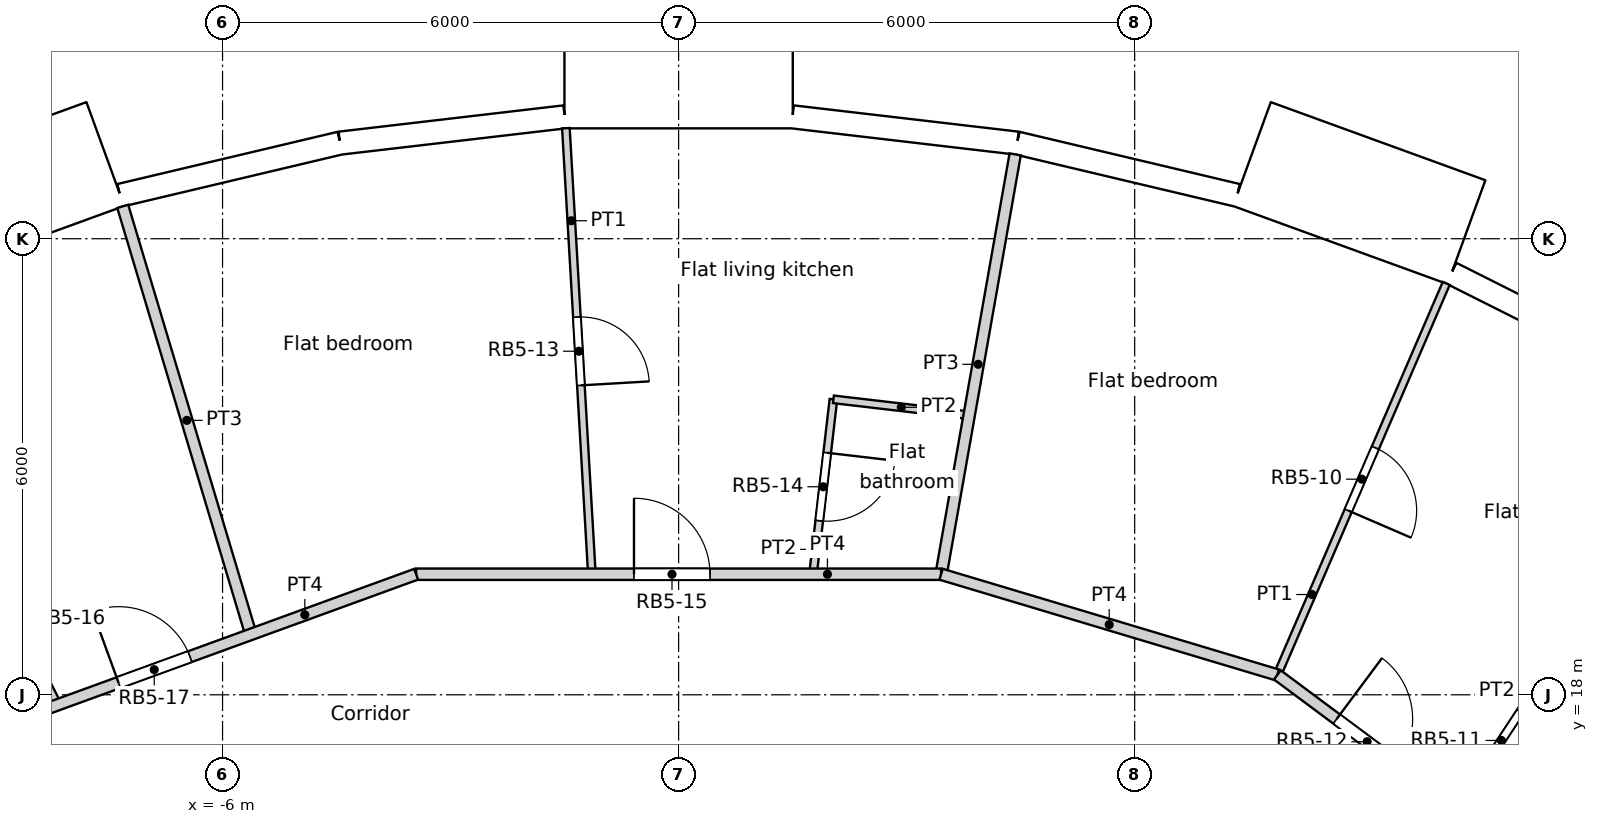
"""IFC4 building model, lengths in metres.
Left out: names, types, materials, properties, quantities, classifications, styles, units other than length and angle.
Written with IfcOpenShell. Run it as: python <this file> out.ifc"""

import sys

from ifc_helpers import new_model, si_unit, direction, frame, frame_2d, origin, origin_2d, place, context, subcontext, project, spatial, rectangle, circle, extrude, element, fill, save


model = new_model("IFC4")
c1 = context("Model", 3, precision=1e-05, world=origin(), true_north=direction((0.0, 1.0)))
c2 = subcontext(c1, "Body", "Model", "MODEL_VIEW")
j1 = project(units=[si_unit("LENGTHUNIT", "METRE"), si_unit("PLANEANGLEUNIT", "RADIAN")], contexts=[c1])
p1 = place(None, origin())
s1 = spatial("IfcSite", under=j1, at=p1, CompositionType="ELEMENT")
p2 = place(p1, origin())
s2 = spatial("IfcBuilding", under=s1, at=p2, CompositionType="ELEMENT")
p3 = place(p2, frame((0.0, 0.0, 169.2)))
s3 = spatial("IfcBuildingStorey", under=s2, at=p3, CompositionType="ELEMENT", Elevation=169.2)
for number, where, z_axis, x_axis in (
    (1, (9.723, 22.54, 0.0), (0.0, 0.0, 1.0), (1.0, 0.0, 0.0)),
    (2, (4.263, 24.175, 0.0), (0.0, 0.0, 1.0), (1.0, 0.0, 0.0)),
    (3, (-1.427, 24.506, 0.0), (0.0, 0.0, 1.0), (1.0, 0.0, 0.0)),
    (4, (-7.04, 23.516, 0.0), (0.0, 0.0, 1.0), (1.0, 0.0, 0.0)),
):
    element("IfcColumn", number, at=place(p3, frame(where, z_axis=z_axis, x_axis=x_axis)), inside=s3, PredefinedType="COLUMN", context=c2, shape_type="SweptSolid", body=[
        extrude(circle(Radius=0.6, at=origin_2d()), origin(), (0.0, 0.0, 1.0), 3.6),
    ])
for number, where, z_axis, x_axis in (
    (5, (6.876, 17.521, 0.0), (0.0, 0.0, 1.0), (1.0, 0.0, 0.0)),
    (6, (1.406, 18.77, 0.0), (0.0, 0.0, 1.0), (1.0, 0.0, 0.0)),
    (7, (-4.188, 18.35, 0.0), (0.0, 0.0, 1.0), (1.0, 0.0, 0.0)),
):
    element("IfcColumn", number, at=place(p3, frame(where, z_axis=z_axis, x_axis=x_axis)), inside=s3, PredefinedType="COLUMN", context=c2, shape_type="SweptSolid", body=[
        extrude(circle(Radius=0.65, at=origin_2d()), origin(), (0.0, 0.0, 1.0), 3.6),
    ])
p4 = place(p3, frame((12.824, 22.211, 0.0), z_axis=(0.0, 0.0, 1.0), x_axis=(-0.893637442555, 0.448789618045, 0.0)))
e8 = element("IfcWall", 8, at=p4, inside=s3, PredefinedType="SOLIDWALL", context=c2, shape_type="SweptSolid", body=[
    extrude(rectangle(XDim=2.973, YDim=0.3, at=frame_2d((1.486, 0.0))), origin(), (0.0, 0.0, 1.0), 3.3),
])
p5 = place(p4, frame((1.486, 0.0, 1.55)))
e9 = element("IfcOpeningElement", 9, at=p5, cuts=e8, PredefinedType="OPENING", context=c2, shape_type="SweptSolid", body=[
    extrude(circle(Radius=0.9, at=origin_2d()), frame((0.0, 0.16, 0.0), z_axis=(0.0, -1.0, 0.0), x_axis=(1.0, 0.0, 0.0)), (0.0, 0.0, 1.0), 0.32),
])
p6 = place(p3, frame((10.363, 24.087, -0.3), z_axis=(0.0, 0.0, 1.0), x_axis=(-0.939686455819, 0.342037080957, 0.0)))
e10 = element("IfcWall", 10, at=p6, inside=s3, PredefinedType="ELEMENTEDWALL", context=c2, shape_type="SweptSolid", body=[
    extrude(rectangle(XDim=3.0, YDim=1.45, at=frame_2d((1.5, 0.0))), origin(), (0.0, 0.0, 1.0), 3.6),
])
p7 = place(p6, frame((1.5, 0.0, 1.85)))
e11 = element("IfcOpeningElement", 11, at=p7, cuts=e10, PredefinedType="OPENING", context=c2, shape_type="SweptSolid", body=[
    extrude(circle(Radius=0.9, at=origin_2d()), frame((0.0, 0.735, 0.0), z_axis=(0.0, -1.0, 0.0), x_axis=(1.0, 0.0, 0.0)), (0.0, 0.0, 1.0), 1.47),
])
p8 = place(p3, frame((7.346, 24.572, 0.0), z_axis=(0.0, 0.0, 1.0), x_axis=(-0.973049746156, 0.230595298102, 0.0)))
e12 = element("IfcWall", 12, at=p8, inside=s3, PredefinedType="SOLIDWALL", context=c2, shape_type="SweptSolid", body=[
    extrude(rectangle(XDim=2.973, YDim=0.3, at=frame_2d((1.486, 0.0))), origin(), (0.0, 0.0, 1.0), 3.3),
])
p9 = place(p8, frame((1.486, 0.0, 1.55)))
e13 = element("IfcOpeningElement", 13, at=p9, cuts=e12, PredefinedType="OPENING", context=c2, shape_type="SweptSolid", body=[
    extrude(circle(Radius=0.9, at=origin_2d()), frame((0.0, 0.16, 0.0), z_axis=(0.0, -1.0, 0.0), x_axis=(1.0, 0.0, 0.0)), (0.0, 0.0, 1.0), 0.32),
])
p10 = place(p3, frame((4.454, 25.258, 0.0), z_axis=(0.0, 0.0, 1.0), x_axis=(-0.993235542767, 0.116116995244, 0.0)))
e14 = element("IfcWall", 14, at=p10, inside=s3, PredefinedType="SOLIDWALL", context=c2, shape_type="SweptSolid", body=[
    extrude(rectangle(XDim=2.973, YDim=0.3, at=frame_2d((1.486, 0.0))), origin(), (0.0, 0.0, 1.0), 3.3),
])
p11 = place(p10, frame((1.486, 0.0, 1.55)))
e15 = element("IfcOpeningElement", 15, at=p11, cuts=e14, PredefinedType="OPENING", context=c2, shape_type="SweptSolid", body=[
    extrude(circle(Radius=0.9, at=origin_2d()), frame((0.0, 0.16, 0.0), z_axis=(0.0, -1.0, 0.0), x_axis=(1.0, 0.0, 0.0)), (0.0, 0.0, 1.0), 0.32),
])
p12 = place(p3, frame((1.5, 26.179, -0.3), z_axis=(0.0, 0.0, 1.0), x_axis=(-1.0, 0.0, 0.0)))
e16 = element("IfcWall", 16, at=p12, inside=s3, PredefinedType="ELEMENTEDWALL", context=c2, shape_type="SweptSolid", body=[
    extrude(rectangle(XDim=3.0, YDim=1.45, at=frame_2d((1.5, 0.0))), origin(), (0.0, 0.0, 1.0), 3.6),
])
p13 = place(p12, frame((1.5, 0.0, 1.85)))
e17 = element("IfcOpeningElement", 17, at=p13, cuts=e16, PredefinedType="OPENING", context=c2, shape_type="SweptSolid", body=[
    extrude(circle(Radius=0.9, at=origin_2d()), frame((0.0, 0.735, 0.0), z_axis=(0.0, -1.0, 0.0), x_axis=(1.0, 0.0, 0.0)), (0.0, 0.0, 1.0), 1.47),
])
p14 = place(p3, frame((-1.501, 25.603, 0.0), z_axis=(0.0, 0.0, 1.0), x_axis=(-0.993235542767, -0.116116995244, 0.0)))
e18 = element("IfcWall", 18, at=p14, inside=s3, PredefinedType="SOLIDWALL", context=c2, shape_type="SweptSolid", body=[
    extrude(rectangle(XDim=2.973, YDim=0.3, at=frame_2d((1.486, 0.0))), origin(), (0.0, 0.0, 1.0), 3.3),
])
p15 = place(p14, frame((1.486, 0.0, 1.55)))
e19 = element("IfcOpeningElement", 19, at=p15, cuts=e18, PredefinedType="OPENING", context=c2, shape_type="SweptSolid", body=[
    extrude(circle(Radius=0.9, at=origin_2d()), frame((0.0, 0.16, 0.0), z_axis=(0.0, -1.0, 0.0), x_axis=(1.0, 0.0, 0.0)), (0.0, 0.0, 1.0), 0.32),
])
p16 = place(p3, frame((-4.454, 25.258, 0.0), z_axis=(0.0, 0.0, 1.0), x_axis=(-0.973049746156, -0.230595298102, 0.0)))
e20 = element("IfcWall", 20, at=p16, inside=s3, PredefinedType="SOLIDWALL", context=c2, shape_type="SweptSolid", body=[
    extrude(rectangle(XDim=2.973, YDim=0.3, at=frame_2d((1.486, 0.0))), origin(), (0.0, 0.0, 1.0), 3.3),
])
p17 = place(p16, frame((1.486, 0.0, 1.55)))
e21 = element("IfcOpeningElement", 21, at=p17, cuts=e20, PredefinedType="OPENING", context=c2, shape_type="SweptSolid", body=[
    extrude(circle(Radius=0.9, at=origin_2d()), frame((0.0, 0.16, 0.0), z_axis=(0.0, -1.0, 0.0), x_axis=(1.0, 0.0, 0.0)), (0.0, 0.0, 1.0), 0.32),
])
p18 = place(p3, frame((-7.544, 25.113, -0.3), z_axis=(0.0, 0.0, 1.0), x_axis=(-0.939686455819, -0.342037080957, 0.0)))
e22 = element("IfcWall", 22, at=p18, inside=s3, PredefinedType="ELEMENTEDWALL", context=c2, shape_type="SweptSolid", body=[
    extrude(rectangle(XDim=3.0, YDim=1.45, at=frame_2d((1.5, 0.0))), origin(), (0.0, 0.0, 1.0), 3.6),
])
p19 = place(p18, frame((1.5, 0.0, 1.85)))
e23 = element("IfcOpeningElement", 23, at=p19, cuts=e22, PredefinedType="OPENING", context=c2, shape_type="SweptSolid", body=[
    extrude(circle(Radius=0.9, at=origin_2d()), frame((0.0, 0.735, 0.0), z_axis=(0.0, -1.0, 0.0), x_axis=(1.0, 0.0, 0.0)), (0.0, 0.0, 1.0), 1.47),
])
p20 = place(p3, frame((7.877, 18.262, 0.0), z_axis=(0.0, 0.0, 1.0), x_axis=(0.802112550244, -0.597172886811, 0.0)))
e24 = element("IfcWall", 24, at=p20, inside=s3, PredefinedType="PARTITIONING", context=c2, shape_type="SweptSolid", body=[
    extrude(rectangle(XDim=9.173, YDim=0.15, at=frame_2d((4.586, 0.0))), origin(), (0.0, 0.0, 1.0), 3.3),
])
p21 = place(p20, frame((0.972, 0.0, 0.0)))
e25 = element("IfcOpeningElement", 25, at=p21, cuts=e24, PredefinedType="OPENING", context=c2, shape_type="SweptSolid", body=[
    extrude(rectangle(XDim=1.0, YDim=2.1, at=frame_2d((0.5, 1.05))), frame((0.0, 0.075, 0.0), z_axis=(0.0, -1.0, 0.0), x_axis=(1.0, 0.0, 0.0)), (0.0, 0.0, 1.0), 0.15),
])
p22 = place(p3, frame((3.453, 19.586, 0.0), z_axis=(0.0, 0.0, 1.0), x_axis=(0.95796149329, -0.286896806141, 0.0)))
e26 = element("IfcWall", 26, at=p22, inside=s3, PredefinedType="PARTITIONING", context=c2, shape_type="SweptSolid", body=[
    extrude(rectangle(XDim=4.618, YDim=0.15, at=frame_2d((2.309, 0.0))), origin(), (0.0, 0.0, 1.0), 3.3),
])
p23 = place(p3, frame((-3.453, 19.586, 0.0), z_axis=(0.0, 0.0, 1.0), x_axis=(1.0, 0.0, 0.0)))
e27 = element("IfcWall", 27, at=p23, inside=s3, PredefinedType="PARTITIONING", context=c2, shape_type="SweptSolid", body=[
    extrude(rectangle(XDim=6.906, YDim=0.15, at=frame_2d((3.453, 0.0))), origin(), (0.0, 0.0, 1.0), 3.3),
])
p24 = place(p23, frame((2.866, 0.0, 0.0)))
e28 = element("IfcOpeningElement", 28, at=p24, cuts=e27, PredefinedType="OPENING", context=c2, shape_type="SweptSolid", body=[
    extrude(rectangle(XDim=1.0, YDim=2.1, at=frame_2d((0.5, 1.05))), frame((0.0, 0.075, 0.0), z_axis=(0.0, -1.0, 0.0), x_axis=(1.0, 0.0, 0.0)), (0.0, 0.0, 1.0), 0.15),
])
p25 = place(p3, frame((-9.944, 17.222, 0.0), z_axis=(0.0, 0.0, 1.0), x_axis=(0.939607544688, 0.342253797591, 0.0)))
e29 = element("IfcWall", 29, at=p25, inside=s3, PredefinedType="PARTITIONING", context=c2, shape_type="SweptSolid", body=[
    extrude(rectangle(XDim=6.908, YDim=0.15, at=frame_2d((3.454, 0.0))), origin(), (0.0, 0.0, 1.0), 3.3),
])
p26 = place(p25, frame((2.74, 0.0, 0.0)))
e30 = element("IfcOpeningElement", 30, at=p26, cuts=e29, PredefinedType="OPENING", context=c2, shape_type="SweptSolid", body=[
    extrude(rectangle(XDim=1.0, YDim=2.1, at=frame_2d((0.5, 1.05))), frame((0.0, 0.075, 0.0), z_axis=(0.0, -1.0, 0.0), x_axis=(1.0, 0.0, 0.0)), (0.0, 0.0, 1.0), 0.15),
])
p27 = place(p3, frame((7.877, 18.261, 0.0), z_axis=(0.0, 0.0, 1.0), x_axis=(0.39610837783, 0.91820376443, 0.0)))
e31 = element("IfcWall", 31, at=p27, inside=s3, PredefinedType="PARTITIONING", context=c2, shape_type="SweptSolid", body=[
    extrude(rectangle(XDim=5.61, YDim=0.1, at=frame_2d((2.805, 0.0))), origin(), (0.0, 0.0, 1.0), 3.3),
])
p28 = place(p27, frame((2.355, 0.0, 0.0)))
e32 = element("IfcOpeningElement", 32, at=p28, cuts=e31, PredefinedType="OPENING", context=c2, shape_type="SweptSolid", body=[
    extrude(rectangle(XDim=0.9, YDim=2.1, at=frame_2d((0.45, 1.05))), frame((0.0, 0.05, 0.0), z_axis=(0.0, -1.0, 0.0), x_axis=(1.0, 0.0, 0.0)), (0.0, 0.0, 1.0), 0.1),
])
p29 = place(p3, frame((10.236, 16.505, 0.0), z_axis=(0.0, 0.0, 1.0), x_axis=(0.5496123138, 0.835419837279, 0.0)))
e33 = element("IfcWall", 33, at=p29, inside=s3, PredefinedType="PARTITIONING", context=c2, shape_type="SweptSolid", body=[
    extrude(rectangle(XDim=2.142, YDim=0.1, at=frame_2d((1.071, 0.0))), origin(), (0.0, 0.0, 1.0), 3.3),
])
p30 = place(p29, frame((0.621, 0.0, 0.0)))
e34 = element("IfcOpeningElement", 34, at=p30, cuts=e33, PredefinedType="OPENING", context=c2, shape_type="SweptSolid", body=[
    extrude(rectangle(XDim=0.9, YDim=2.0, at=frame_2d((0.45, 1.0))), frame((0.0, 0.05, 0.0), z_axis=(0.0, -1.0, 0.0), x_axis=(1.0, 0.0, 0.0)), (0.0, 0.0, 1.0), 0.1),
])
p31 = place(p3, frame((3.454, 19.586, 0.0), z_axis=(0.0, 0.0, 1.0), x_axis=(0.173700915874, 0.984798452387, 0.0)))
e35 = element("IfcWall", 35, at=p31, inside=s3, PredefinedType="PARTITIONING", context=c2, shape_type="SweptSolid", body=[
    extrude(rectangle(XDim=5.609, YDim=0.15, at=frame_2d((2.805, 0.0))), origin(), (0.0, 0.0, 1.0), 3.3),
])
p32 = place(p3, frame((-1.483, 25.454, 0.0), z_axis=(0.0, 0.0, 1.0), x_axis=(0.058147412668, -0.998308007781, 0.0)))
e36 = element("IfcWall", 36, at=p32, inside=s3, PredefinedType="PARTITIONING", context=c2, shape_type="SweptSolid", body=[
    extrude(rectangle(XDim=5.878, YDim=0.1, at=frame_2d((2.939, 0.0))), origin(), (0.0, 0.0, 1.0), 3.3),
])
p33 = place(p32, frame((2.489, 0.0, 0.0)))
e37 = element("IfcOpeningElement", 37, at=p33, cuts=e36, PredefinedType="OPENING", context=c2, shape_type="SweptSolid", body=[
    extrude(rectangle(XDim=0.9, YDim=2.1, at=frame_2d((0.45, 1.05))), frame((0.0, 0.05, 0.0), z_axis=(0.0, -1.0, 0.0), x_axis=(1.0, 0.0, 0.0)), (0.0, 0.0, 1.0), 0.1),
])
p34 = place(p3, frame((2.037, 21.887, 0.0), z_axis=(0.0, 0.0, 1.0), x_axis=(0.993215363366, -0.116289474906, 0.0)))
e38 = element("IfcWall", 38, at=p34, inside=s3, PredefinedType="PARTITIONING", context=c2, shape_type="SweptSolid", body=[
    extrude(rectangle(XDim=1.797, YDim=0.1, at=frame_2d((0.898, 0.0))), origin(), (0.0, 0.0, 1.0), 3.3),
])
p35 = place(p3, frame((1.768, 19.586, 0.0), z_axis=(0.0, 0.0, 1.0), x_axis=(0.116131951318, 0.993233794171, 0.0)))
e39 = element("IfcWall", 39, at=p35, inside=s3, PredefinedType="PARTITIONING", context=c2, shape_type="SweptSolid", body=[
    extrude(rectangle(XDim=2.317, YDim=0.1, at=frame_2d((1.158, 0.0))), origin(), (0.0, 0.0, 1.0), 3.3),
])
p36 = place(p35, frame((0.709, 0.0, 0.0)))
e40 = element("IfcOpeningElement", 40, at=p36, cuts=e39, PredefinedType="OPENING", context=c2, shape_type="SweptSolid", body=[
    extrude(rectangle(XDim=0.9, YDim=2.0, at=frame_2d((0.45, 1.0))), frame((0.0, 0.05, 0.0), z_axis=(0.0, -1.0, 0.0), x_axis=(1.0, 0.0, 0.0)), (0.0, 0.0, 1.0), 0.1),
])
p37 = place(p3, frame((-7.313, 24.426, 0.0), z_axis=(0.0, 0.0, 1.0), x_axis=(0.286833432865, -0.957980470464, 0.0)))
e41 = element("IfcWall", 41, at=p37, inside=s3, PredefinedType="PARTITIONING", context=c2, shape_type="SweptSolid", body=[
    extrude(rectangle(XDim=5.878, YDim=0.15, at=frame_2d((2.939, 0.0))), origin(), (0.0, 0.0, 1.0), 3.3),
])
p38 = place(p3, frame((-9.306, 20.128, 0.0), z_axis=(0.0, 0.0, 1.0), x_axis=(0.448950999616, -0.893556377597, 0.0)))
e42 = element("IfcWall", 42, at=p38, inside=s3, PredefinedType="PARTITIONING", context=c2, shape_type="SweptSolid", body=[
    extrude(rectangle(XDim=2.528, YDim=0.1, at=frame_2d((1.264, 0.0))), origin(), (0.0, 0.0, 1.0), 3.3),
])
p39 = place(p38, frame((0.814, 0.0, 0.0)))
e43 = element("IfcOpeningElement", 43, at=p39, cuts=e42, PredefinedType="OPENING", context=c2, shape_type="SweptSolid", body=[
    extrude(rectangle(XDim=0.9, YDim=2.04, at=frame_2d((0.45, 1.02))), frame((0.0, 0.05, 0.0), z_axis=(0.0, -1.0, 0.0), x_axis=(1.0, 0.0, 0.0)), (0.0, 0.0, 1.0), 0.1),
])
p40 = place(p5, origin())
e44 = element("IfcWindow", 44, at=p40, inside=s3, PartitioningType="SINGLE_PANEL", PredefinedType="WINDOW", context=c2, shape_type="SweptSolid", body=[
    extrude(circle(Radius=0.9, at=origin_2d()), frame((0.0, 0.12, 0.0), z_axis=(0.0, -1.0, 0.0), x_axis=(1.0, 0.0, 0.0)), (0.0, 0.0, 1.0), 0.1),
])
fill(e9, e44)
p41 = place(p7, origin())
e45 = element("IfcWindow", 45, at=p41, inside=s3, PartitioningType="SINGLE_PANEL", PredefinedType="WINDOW", context=c2, shape_type="SweptSolid", body=[
    extrude(circle(Radius=0.9, at=origin_2d()), frame((0.0, 0.695, 0.0), z_axis=(0.0, -1.0, 0.0), x_axis=(1.0, 0.0, 0.0)), (0.0, 0.0, 1.0), 0.1),
])
fill(e11, e45)
p42 = place(p9, origin())
e46 = element("IfcWindow", 46, at=p42, inside=s3, PartitioningType="SINGLE_PANEL", PredefinedType="WINDOW", context=c2, shape_type="SweptSolid", body=[
    extrude(circle(Radius=0.9, at=origin_2d()), frame((0.0, 0.12, 0.0), z_axis=(0.0, -1.0, 0.0), x_axis=(1.0, 0.0, 0.0)), (0.0, 0.0, 1.0), 0.1),
])
fill(e13, e46)
p43 = place(p11, origin())
e47 = element("IfcWindow", 47, at=p43, inside=s3, PartitioningType="SINGLE_PANEL", PredefinedType="WINDOW", context=c2, shape_type="SweptSolid", body=[
    extrude(circle(Radius=0.9, at=origin_2d()), frame((0.0, 0.12, 0.0), z_axis=(0.0, -1.0, 0.0), x_axis=(1.0, 0.0, 0.0)), (0.0, 0.0, 1.0), 0.1),
])
fill(e15, e47)
p44 = place(p13, origin())
e48 = element("IfcWindow", 48, at=p44, inside=s3, PartitioningType="SINGLE_PANEL", PredefinedType="WINDOW", context=c2, shape_type="SweptSolid", body=[
    extrude(circle(Radius=0.9, at=origin_2d()), frame((0.0, 0.695, 0.0), z_axis=(0.0, -1.0, 0.0), x_axis=(1.0, 0.0, 0.0)), (0.0, 0.0, 1.0), 0.1),
])
fill(e17, e48)
p45 = place(p15, origin())
e49 = element("IfcWindow", 49, at=p45, inside=s3, PartitioningType="SINGLE_PANEL", PredefinedType="WINDOW", context=c2, shape_type="SweptSolid", body=[
    extrude(circle(Radius=0.9, at=origin_2d()), frame((0.0, 0.12, 0.0), z_axis=(0.0, -1.0, 0.0), x_axis=(1.0, 0.0, 0.0)), (0.0, 0.0, 1.0), 0.1),
])
fill(e19, e49)
p46 = place(p17, origin())
e50 = element("IfcWindow", 50, at=p46, inside=s3, PartitioningType="SINGLE_PANEL", PredefinedType="WINDOW", context=c2, shape_type="SweptSolid", body=[
    extrude(circle(Radius=0.9, at=origin_2d()), frame((0.0, 0.12, 0.0), z_axis=(0.0, -1.0, 0.0), x_axis=(1.0, 0.0, 0.0)), (0.0, 0.0, 1.0), 0.1),
])
fill(e21, e50)
p47 = place(p19, origin())
e51 = element("IfcWindow", 51, at=p47, inside=s3, PartitioningType="SINGLE_PANEL", PredefinedType="WINDOW", context=c2, shape_type="SweptSolid", body=[
    extrude(circle(Radius=0.9, at=origin_2d()), frame((0.0, 0.695, 0.0), z_axis=(0.0, -1.0, 0.0), x_axis=(1.0, 0.0, 0.0)), (0.0, 0.0, 1.0), 0.1),
])
fill(e23, e51)
p48 = place(p28, origin())
e52 = element("IfcDoor", 52, at=p48, inside=s3, OperationType="SINGLE_SWING_RIGHT", PredefinedType="DOOR", context=c2, shape_type="SweptSolid", body=[
    extrude(rectangle(XDim=0.9, YDim=2.1, at=frame_2d((0.45, 1.05))), frame((0.0, 0.025, 0.0), z_axis=(0.0, -1.0, 0.0), x_axis=(1.0, 0.0, 0.0)), (0.0, 0.0, 1.0), 0.05),
])
fill(e32, e52)
p49 = place(p30, origin())
e53 = element("IfcDoor", 53, at=p49, inside=s3, OperationType="SINGLE_SWING_RIGHT", PredefinedType="DOOR", context=c2, shape_type="SweptSolid", body=[
    extrude(rectangle(XDim=0.9, YDim=2.0, at=frame_2d((0.45, 1.0))), frame((0.0, 0.025, 0.0), z_axis=(0.0, -1.0, 0.0), x_axis=(1.0, 0.0, 0.0)), (0.0, 0.0, 1.0), 0.05),
])
fill(e34, e53)
p50 = place(p21, origin())
e54 = element("IfcDoor", 54, at=p50, inside=s3, OperationType="SINGLE_SWING_LEFT", PredefinedType="DOOR", context=c2, shape_type="SweptSolid", body=[
    extrude(rectangle(XDim=1.0, YDim=2.1, at=frame_2d((0.5, 1.05))), frame((0.0, 0.025, 0.0), z_axis=(0.0, -1.0, 0.0), x_axis=(1.0, 0.0, 0.0)), (0.0, 0.0, 1.0), 0.05),
])
fill(e25, e54)
p51 = place(p33, origin())
e55 = element("IfcDoor", 55, at=p51, inside=s3, OperationType="SINGLE_SWING_RIGHT", PredefinedType="DOOR", context=c2, shape_type="SweptSolid", body=[
    extrude(rectangle(XDim=0.9, YDim=2.1, at=frame_2d((0.45, 1.05))), frame((0.0, 0.025, 0.0), z_axis=(0.0, -1.0, 0.0), x_axis=(1.0, 0.0, 0.0)), (0.0, 0.0, 1.0), 0.05),
])
fill(e37, e55)
p52 = place(p36, origin())
e56 = element("IfcDoor", 56, at=p52, inside=s3, OperationType="SINGLE_SWING_LEFT", PredefinedType="DOOR", context=c2, shape_type="SweptSolid", body=[
    extrude(rectangle(XDim=0.9, YDim=2.0, at=frame_2d((0.45, 1.0))), frame((0.0, 0.025, 0.0), z_axis=(0.0, -1.0, 0.0), x_axis=(1.0, 0.0, 0.0)), (0.0, 0.0, 1.0), 0.05),
])
fill(e40, e56)
p53 = place(p24, origin())
e57 = element("IfcDoor", 57, at=p53, inside=s3, OperationType="SINGLE_SWING_LEFT", PredefinedType="DOOR", context=c2, shape_type="SweptSolid", body=[
    extrude(rectangle(XDim=1.0, YDim=2.1, at=frame_2d((0.5, 1.05))), frame((0.0, 0.025, 0.0), z_axis=(0.0, -1.0, 0.0), x_axis=(1.0, 0.0, 0.0)), (0.0, 0.0, 1.0), 0.05),
])
fill(e28, e57)
p54 = place(p26, origin())
e58 = element("IfcDoor", 58, at=p54, inside=s3, OperationType="SINGLE_SWING_LEFT", PredefinedType="DOOR", context=c2, shape_type="SweptSolid", body=[
    extrude(rectangle(XDim=1.0, YDim=2.1, at=frame_2d((0.5, 1.05))), frame((0.0, 0.025, 0.0), z_axis=(0.0, -1.0, 0.0), x_axis=(1.0, 0.0, 0.0)), (0.0, 0.0, 1.0), 0.05),
])
fill(e30, e58)
save(model, sys.argv[1])
